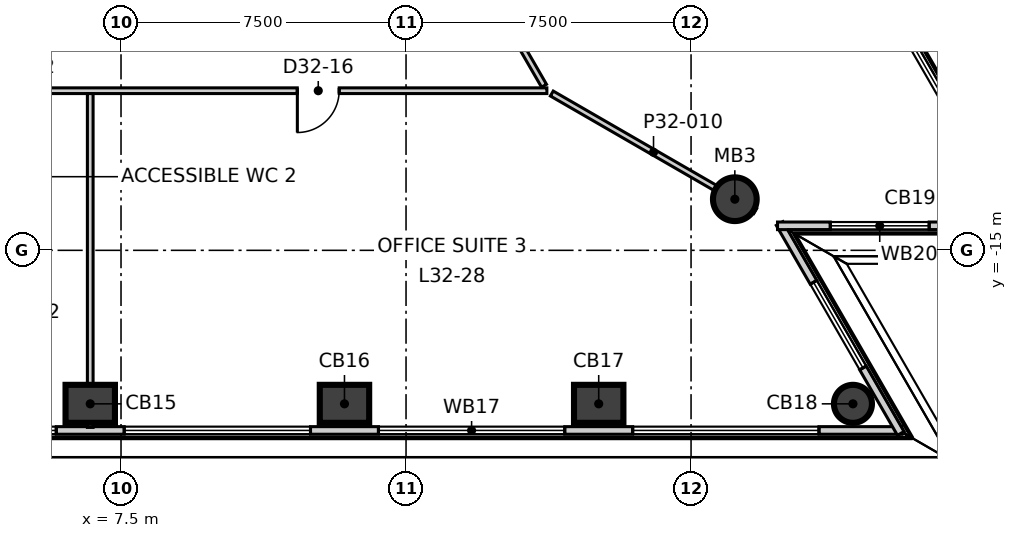
"""IFC4 building model, lengths in metres.
Left out: names, types, materials, properties, quantities, classifications, styles, units other than length and angle.
Written with IfcOpenShell. Run it as: python <this file> out.ifc"""

import sys

from ifc_helpers import new_model, si_unit, direction, frame, frame_2d, origin, origin_2d, place, context, subcontext, project, spatial, rectangle, circle, extrude, element, fill, save


model = new_model("IFC4")
c1 = context("Model", 3, precision=1e-05, world=origin(), true_north=direction((0.0, 1.0)))
c2 = subcontext(c1, "Body", "Model", "MODEL_VIEW")
j1 = project(units=[si_unit("LENGTHUNIT", "METRE"), si_unit("PLANEANGLEUNIT", "RADIAN")], contexts=[c1])
p1 = place(None, origin())
s1 = spatial("IfcSite", under=j1, at=p1, CompositionType="ELEMENT")
p2 = place(p1, origin())
s2 = spatial("IfcBuilding", under=s1, at=p2, CompositionType="ELEMENT")
p3 = place(p2, frame((0.0, 0.0, 140.3)))
s3 = spatial("IfcBuildingStorey", under=s2, at=p3, CompositionType="ELEMENT", Elevation=140.3)
for number, where, z_axis, x_axis in (
    (1, (6.69, -19.039, -0.3), (0.0, 0.0, 1.0), (1.0, 0.0, 0.0)),
    (2, (13.38, -19.039, -0.3), (0.0, 0.0, 1.0), (1.0, 0.0, 0.0)),
    (3, (20.07, -19.039, -0.3), (0.0, 0.0, 1.0), (1.0, 0.0, 0.0)),
):
    element("IfcColumn", number, at=place(p3, frame(where, z_axis=z_axis, x_axis=x_axis)), inside=s3, PredefinedType="COLUMN", context=c2, shape_type="SweptSolid", body=[
        extrude(rectangle(XDim=1.3, YDim=1.0, at=origin_2d()), origin(), (0.0, 0.0, 1.0), 4.0),
    ])
p4 = place(p3, frame((26.76, -19.039, -0.3), z_axis=(0.0, 0.0, 1.0), x_axis=(1.0, 0.0, 0.0)))
e4 = element("IfcColumn", 4, at=p4, inside=s3, PredefinedType="COLUMN", context=c2, shape_type="SweptSolid", body=[
    extrude(circle(Radius=0.5, at=origin_2d()), origin(), (0.0, 0.0, 1.0), 4.0),
])
p5 = place(p3, frame((23.652, -13.655, -0.3), z_axis=(0.0, 0.0, 1.0), x_axis=(1.0, 0.0, 0.0)))
e5 = element("IfcColumn", 5, at=p5, inside=s3, PredefinedType="COLUMN", context=c2, shape_type="SweptSolid", body=[
    extrude(circle(Radius=0.575, at=origin_2d()), origin(), (0.0, 0.0, 1.0), 4.0),
])
p6 = place(p3, frame((-28.063, -19.739, 0.0), z_axis=(0.0, 0.0, 1.0), x_axis=(1.0, 0.0, 0.0)))
e6 = element("IfcWall", 6, at=p6, inside=s3, PredefinedType="ELEMENTEDWALL", context=c2, shape_type="SweptSolid", body=[
    extrude(rectangle(XDim=56.106, YDim=0.2, at=frame_2d((28.053, 0.0))), origin(), (0.0, 0.0, 1.0), 3.7),
])
p7 = place(p6, frame((2.198, 0.0, 0.9)))
e7 = element("IfcOpeningElement", 7, at=p7, cuts=e6, PredefinedType="OPENING", context=c2, shape_type="SweptSolid", body=[
    extrude(rectangle(XDim=4.9, YDim=2.5, at=frame_2d((2.45, 1.25))), frame((0.0, 0.11, 0.0), z_axis=(0.0, -1.0, 0.0), x_axis=(1.0, 0.0, 0.0)), (0.0, 0.0, 1.0), 0.22),
])
p8 = place(p6, frame((8.888, 0.0, 0.9)))
e8 = element("IfcOpeningElement", 8, at=p8, cuts=e6, PredefinedType="OPENING", context=c2, shape_type="SweptSolid", body=[
    extrude(rectangle(XDim=4.9, YDim=2.5, at=frame_2d((2.45, 1.25))), frame((0.0, 0.11, 0.0), z_axis=(0.0, -1.0, 0.0), x_axis=(1.0, 0.0, 0.0)), (0.0, 0.0, 1.0), 0.22),
])
p9 = place(p6, frame((15.578, 0.0, 0.9)))
e9 = element("IfcOpeningElement", 9, at=p9, cuts=e6, PredefinedType="OPENING", context=c2, shape_type="SweptSolid", body=[
    extrude(rectangle(XDim=4.9, YDim=2.5, at=frame_2d((2.45, 1.25))), frame((0.0, 0.11, 0.0), z_axis=(0.0, -1.0, 0.0), x_axis=(1.0, 0.0, 0.0)), (0.0, 0.0, 1.0), 0.22),
])
p10 = place(p6, frame((22.268, 0.0, 0.9)))
e10 = element("IfcOpeningElement", 10, at=p10, cuts=e6, PredefinedType="OPENING", context=c2, shape_type="SweptSolid", body=[
    extrude(rectangle(XDim=4.9, YDim=2.5, at=frame_2d((2.45, 1.25))), frame((0.0, 0.11, 0.0), z_axis=(0.0, -1.0, 0.0), x_axis=(1.0, 0.0, 0.0)), (0.0, 0.0, 1.0), 0.22),
])
p11 = place(p6, frame((28.958, 0.0, 0.9)))
e11 = element("IfcOpeningElement", 11, at=p11, cuts=e6, PredefinedType="OPENING", context=c2, shape_type="SweptSolid", body=[
    extrude(rectangle(XDim=4.9, YDim=2.5, at=frame_2d((2.45, 1.25))), frame((0.0, 0.11, 0.0), z_axis=(0.0, -1.0, 0.0), x_axis=(1.0, 0.0, 0.0)), (0.0, 0.0, 1.0), 0.22),
])
p12 = place(p6, frame((35.648, 0.0, 0.9)))
e12 = element("IfcOpeningElement", 12, at=p12, cuts=e6, PredefinedType="OPENING", context=c2, shape_type="SweptSolid", body=[
    extrude(rectangle(XDim=4.9, YDim=2.5, at=frame_2d((2.45, 1.25))), frame((0.0, 0.11, 0.0), z_axis=(0.0, -1.0, 0.0), x_axis=(1.0, 0.0, 0.0)), (0.0, 0.0, 1.0), 0.22),
])
p13 = place(p6, frame((42.338, 0.0, 0.9)))
e13 = element("IfcOpeningElement", 13, at=p13, cuts=e6, PredefinedType="OPENING", context=c2, shape_type="SweptSolid", body=[
    extrude(rectangle(XDim=4.9, YDim=2.5, at=frame_2d((2.45, 1.25))), frame((0.0, 0.11, 0.0), z_axis=(0.0, -1.0, 0.0), x_axis=(1.0, 0.0, 0.0)), (0.0, 0.0, 1.0), 0.22),
])
p14 = place(p6, frame((49.028, 0.0, 0.9)))
e14 = element("IfcOpeningElement", 14, at=p14, cuts=e6, PredefinedType="OPENING", context=c2, shape_type="SweptSolid", body=[
    extrude(rectangle(XDim=4.9, YDim=2.5, at=frame_2d((2.45, 1.25))), frame((0.0, 0.11, 0.0), z_axis=(0.0, -1.0, 0.0), x_axis=(1.0, 0.0, 0.0)), (0.0, 0.0, 1.0), 0.22),
])
p15 = place(p3, frame((28.018, -19.817, 0.0), z_axis=(0.0, 0.0, 1.0), x_axis=(-0.499919089554, 0.866072112413, 0.0)))
e15 = element("IfcWall", 15, at=p15, inside=s3, PredefinedType="ELEMENTEDWALL", context=c2, shape_type="SweptSolid", body=[
    extrude(rectangle(XDim=6.377, YDim=0.2, at=frame_2d((3.188, 0.0))), origin(), (0.0, 0.0, 1.0), 3.7),
])
p16 = place(p15, frame((1.99, 0.0, 0.9)))
e16 = element("IfcOpeningElement", 16, at=p16, cuts=e15, PredefinedType="OPENING", context=c2, shape_type="SweptSolid", body=[
    extrude(rectangle(XDim=2.6, YDim=2.5, at=frame_2d((1.3, 1.25))), frame((0.0, 0.11, 0.0), z_axis=(0.0, -1.0, 0.0), x_axis=(1.0, 0.0, 0.0)), (0.0, 0.0, 1.0), 0.22),
])
p17 = place(p3, frame((24.775, -14.355, 0.0), z_axis=(0.0, 0.0, 1.0), x_axis=(1.0, 0.0, 0.0)))
e17 = element("IfcWall", 17, at=p17, inside=s3, PredefinedType="ELEMENTEDWALL", context=c2, shape_type="SweptSolid", body=[
    extrude(rectangle(XDim=6.376, YDim=0.2, at=frame_2d((3.188, 0.0))), origin(), (0.0, 0.0, 1.0), 3.7),
])
p18 = place(p17, frame((1.39, 0.0, 0.9)))
e18 = element("IfcOpeningElement", 18, at=p18, cuts=e17, PredefinedType="OPENING", context=c2, shape_type="SweptSolid", body=[
    extrude(rectangle(XDim=2.6, YDim=2.5, at=frame_2d((1.3, 1.25))), frame((0.0, 0.11, 0.0), z_axis=(0.0, -1.0, 0.0), x_axis=(1.0, 0.0, 0.0)), (0.0, 0.0, 1.0), 0.22),
])
p19 = place(p3, frame((31.126, -14.433, 0.0), z_axis=(0.0, 0.0, 1.0), x_axis=(-0.500008098571, 0.866020728022, 0.0)))
e19 = element("IfcWall", 19, at=p19, inside=s3, PredefinedType="ELEMENTEDWALL", context=c2, shape_type="SweptSolid", body=[
    extrude(rectangle(XDim=56.105, YDim=0.2, at=frame_2d((28.052, 0.0))), origin(), (0.0, 0.0, 1.0), 3.7),
])
p20 = place(p19, frame((2.198, 0.0, 0.9)))
e20 = element("IfcOpeningElement", 20, at=p20, cuts=e19, PredefinedType="OPENING", context=c2, shape_type="SweptSolid", body=[
    extrude(rectangle(XDim=4.9, YDim=2.5, at=frame_2d((2.45, 1.25))), frame((0.0, 0.11, 0.0), z_axis=(0.0, -1.0, 0.0), x_axis=(1.0, 0.0, 0.0)), (0.0, 0.0, 1.0), 0.22),
])
p21 = place(p19, frame((8.888, 0.0, 0.9)))
e21 = element("IfcOpeningElement", 21, at=p21, cuts=e19, PredefinedType="OPENING", context=c2, shape_type="SweptSolid", body=[
    extrude(rectangle(XDim=4.9, YDim=2.5, at=frame_2d((2.45, 1.25))), frame((0.0, 0.11, 0.0), z_axis=(0.0, -1.0, 0.0), x_axis=(1.0, 0.0, 0.0)), (0.0, 0.0, 1.0), 0.22),
])
p22 = place(p19, frame((15.578, 0.0, 0.9)))
e22 = element("IfcOpeningElement", 22, at=p22, cuts=e19, PredefinedType="OPENING", context=c2, shape_type="SweptSolid", body=[
    extrude(rectangle(XDim=4.9, YDim=2.5, at=frame_2d((2.45, 1.25))), frame((0.0, 0.11, 0.0), z_axis=(0.0, -1.0, 0.0), x_axis=(1.0, 0.0, 0.0)), (0.0, 0.0, 1.0), 0.22),
])
p23 = place(p19, frame((22.267, 0.0, 0.9)))
e23 = element("IfcOpeningElement", 23, at=p23, cuts=e19, PredefinedType="OPENING", context=c2, shape_type="SweptSolid", body=[
    extrude(rectangle(XDim=4.9, YDim=2.5, at=frame_2d((2.45, 1.25))), frame((0.0, 0.11, 0.0), z_axis=(0.0, -1.0, 0.0), x_axis=(1.0, 0.0, 0.0)), (0.0, 0.0, 1.0), 0.22),
])
p24 = place(p19, frame((28.957, 0.0, 0.9)))
e24 = element("IfcOpeningElement", 24, at=p24, cuts=e19, PredefinedType="OPENING", context=c2, shape_type="SweptSolid", body=[
    extrude(rectangle(XDim=4.9, YDim=2.5, at=frame_2d((2.45, 1.25))), frame((0.0, 0.11, 0.0), z_axis=(0.0, -1.0, 0.0), x_axis=(1.0, 0.0, 0.0)), (0.0, 0.0, 1.0), 0.22),
])
p25 = place(p19, frame((35.647, 0.0, 0.9)))
e25 = element("IfcOpeningElement", 25, at=p25, cuts=e19, PredefinedType="OPENING", context=c2, shape_type="SweptSolid", body=[
    extrude(rectangle(XDim=4.9, YDim=2.5, at=frame_2d((2.45, 1.25))), frame((0.0, 0.11, 0.0), z_axis=(0.0, -1.0, 0.0), x_axis=(1.0, 0.0, 0.0)), (0.0, 0.0, 1.0), 0.22),
])
p26 = place(p19, frame((42.337, 0.0, 0.9)))
e26 = element("IfcOpeningElement", 26, at=p26, cuts=e19, PredefinedType="OPENING", context=c2, shape_type="SweptSolid", body=[
    extrude(rectangle(XDim=4.9, YDim=2.5, at=frame_2d((2.45, 1.25))), frame((0.0, 0.11, 0.0), z_axis=(0.0, -1.0, 0.0), x_axis=(1.0, 0.0, 0.0)), (0.0, 0.0, 1.0), 0.22),
])
p27 = place(p19, frame((49.027, 0.0, 0.9)))
e27 = element("IfcOpeningElement", 27, at=p27, cuts=e19, PredefinedType="OPENING", context=c2, shape_type="SweptSolid", body=[
    extrude(rectangle(XDim=4.9, YDim=2.5, at=frame_2d((2.45, 1.25))), frame((0.0, 0.11, 0.0), z_axis=(0.0, -1.0, 0.0), x_axis=(1.0, 0.0, 0.0)), (0.0, 0.0, 1.0), 0.22),
])
p28 = place(p3, frame((-5.789, -10.8, 0.0), z_axis=(0.0, 0.0, 1.0), x_axis=(1.0, 0.0, 0.0)))
e28 = element("IfcWall", 28, at=p28, inside=s3, PredefinedType="PARTITIONING", context=c2, shape_type="SweptSolid", body=[
    extrude(rectangle(XDim=24.495, YDim=0.15, at=frame_2d((12.248, 0.0))), origin(), (0.0, 0.0, 1.0), 3.7),
])
p29 = place(p28, frame((10.049, 0.0, 0.0)))
e29 = element("IfcOpeningElement", 29, at=p29, cuts=e28, PredefinedType="OPENING", context=c2, shape_type="SweptSolid", body=[
    extrude(rectangle(XDim=1.1, YDim=2.1, at=frame_2d((0.55, 1.05))), frame((0.0, 0.085, 0.0), z_axis=(0.0, -1.0, 0.0), x_axis=(1.0, 0.0, 0.0)), (0.0, 0.0, 1.0), 0.17),
])
p30 = place(p28, frame((4.349, 0.0, 0.0)))
e30 = element("IfcOpeningElement", 30, at=p30, cuts=e28, PredefinedType="OPENING", context=c2, shape_type="SweptSolid", body=[
    extrude(rectangle(XDim=0.9, YDim=2.1, at=frame_2d((0.45, 1.05))), frame((0.0, 0.085, 0.0), z_axis=(0.0, -1.0, 0.0), x_axis=(1.0, 0.0, 0.0)), (0.0, 0.0, 1.0), 0.17),
])
p31 = place(p28, frame((7.149, 0.0, 0.0)))
e31 = element("IfcOpeningElement", 31, at=p31, cuts=e28, PredefinedType="OPENING", context=c2, shape_type="SweptSolid", body=[
    extrude(rectangle(XDim=1.0, YDim=2.1, at=frame_2d((0.5, 1.05))), frame((0.0, 0.085, 0.0), z_axis=(0.0, -1.0, 0.0), x_axis=(1.0, 0.0, 0.0)), (0.0, 0.0, 1.0), 0.17),
])
p32 = place(p28, frame((17.929, 0.0, 0.0)))
e32 = element("IfcOpeningElement", 32, at=p32, cuts=e28, PredefinedType="OPENING", context=c2, shape_type="SweptSolid", body=[
    extrude(rectangle(XDim=1.1, YDim=2.1, at=frame_2d((0.55, 1.05))), frame((0.0, 0.085, 0.0), z_axis=(0.0, -1.0, 0.0), x_axis=(1.0, 0.0, 0.0)), (0.0, 0.0, 1.0), 0.17),
])
p33 = place(p3, frame((18.836, -10.874, 0.0), z_axis=(0.0, 0.0, 1.0), x_axis=(0.865990889316, -0.500059776048, 0.0)))
e33 = element("IfcWall", 33, at=p33, inside=s3, PredefinedType="PARTITIONING", context=c2, shape_type="SweptSolid", body=[
    extrude(rectangle(XDim=6.181, YDim=0.15, at=frame_2d((3.091, 0.0))), origin(), (0.0, 0.0, 1.0), 3.15),
])
p34 = place(p3, frame((13.148, -1.174, 0.0), z_axis=(0.0, 0.0, 1.0), x_axis=(0.500088017957, -0.865974580629, 0.0)))
e34 = element("IfcWall", 34, at=p34, inside=s3, PredefinedType="PARTITIONING", context=c2, shape_type="SweptSolid", body=[
    extrude(rectangle(XDim=10.964, YDim=0.15, at=frame_2d((5.482, 0.0))), origin(), (0.0, 0.0, 1.0), 3.7),
])
p35 = place(p34, frame((4.964, 0.0, 0.0)))
e35 = element("IfcOpeningElement", 35, at=p35, cuts=e34, PredefinedType="OPENING", context=c2, shape_type="SweptSolid", body=[
    extrude(rectangle(XDim=1.1, YDim=2.1, at=frame_2d((0.55, 1.05))), frame((0.0, 0.085, 0.0), z_axis=(0.0, -1.0, 0.0), x_axis=(1.0, 0.0, 0.0)), (0.0, 0.0, 1.0), 0.17),
])
p36 = place(p3, frame((6.69, -19.659, 0.0), z_axis=(0.0, 0.0, 1.0), x_axis=(0.0, 1.0, 0.0)))
e36 = element("IfcWall", 36, at=p36, inside=s3, PredefinedType="PARTITIONING", context=c2, shape_type="SweptSolid", body=[
    extrude(rectangle(XDim=8.784, YDim=0.15, at=frame_2d((4.392, 0.0))), origin(), (0.0, 0.0, 1.0), 3.7),
])
p37 = place(p11, origin())
e37 = element("IfcWindow", 37, at=p37, inside=s3, PartitioningType="SINGLE_PANEL", PredefinedType="WINDOW", context=c2, shape_type="SweptSolid", body=[
    extrude(rectangle(XDim=4.9, YDim=2.5, at=frame_2d((2.45, 1.25))), frame((0.0, 0.03, 0.0), z_axis=(0.0, -1.0, 0.0), x_axis=(1.0, 0.0, 0.0)), (0.0, 0.0, 1.0), 0.06),
])
fill(e11, e37)
p38 = place(p12, origin())
e38 = element("IfcWindow", 38, at=p38, inside=s3, PartitioningType="SINGLE_PANEL", PredefinedType="WINDOW", context=c2, shape_type="SweptSolid", body=[
    extrude(rectangle(XDim=4.9, YDim=2.5, at=frame_2d((2.45, 1.25))), frame((0.0, 0.03, 0.0), z_axis=(0.0, -1.0, 0.0), x_axis=(1.0, 0.0, 0.0)), (0.0, 0.0, 1.0), 0.06),
])
fill(e12, e38)
p39 = place(p13, origin())
e39 = element("IfcWindow", 39, at=p39, inside=s3, PartitioningType="SINGLE_PANEL", PredefinedType="WINDOW", context=c2, shape_type="SweptSolid", body=[
    extrude(rectangle(XDim=4.9, YDim=2.5, at=frame_2d((2.45, 1.25))), frame((0.0, 0.03, 0.0), z_axis=(0.0, -1.0, 0.0), x_axis=(1.0, 0.0, 0.0)), (0.0, 0.0, 1.0), 0.06),
])
fill(e13, e39)
p40 = place(p14, origin())
e40 = element("IfcWindow", 40, at=p40, inside=s3, PartitioningType="SINGLE_PANEL", PredefinedType="WINDOW", context=c2, shape_type="SweptSolid", body=[
    extrude(rectangle(XDim=4.9, YDim=2.5, at=frame_2d((2.45, 1.25))), frame((0.0, 0.03, 0.0), z_axis=(0.0, -1.0, 0.0), x_axis=(1.0, 0.0, 0.0)), (0.0, 0.0, 1.0), 0.06),
])
fill(e14, e40)
p41 = place(p16, origin())
e41 = element("IfcWindow", 41, at=p41, inside=s3, PartitioningType="SINGLE_PANEL", PredefinedType="WINDOW", context=c2, shape_type="SweptSolid", body=[
    extrude(rectangle(XDim=2.6, YDim=2.5, at=frame_2d((1.3, 1.25))), frame((0.0, 0.03, 0.0), z_axis=(0.0, -1.0, 0.0), x_axis=(1.0, 0.0, 0.0)), (0.0, 0.0, 1.0), 0.06),
])
fill(e16, e41)
p42 = place(p18, origin())
e42 = element("IfcWindow", 42, at=p42, inside=s3, PartitioningType="SINGLE_PANEL", PredefinedType="WINDOW", context=c2, shape_type="SweptSolid", body=[
    extrude(rectangle(XDim=2.6, YDim=2.5, at=frame_2d((1.3, 1.25))), frame((0.0, 0.03, 0.0), z_axis=(0.0, -1.0, 0.0), x_axis=(1.0, 0.0, 0.0)), (0.0, 0.0, 1.0), 0.06),
])
fill(e18, e42)
p43 = place(p20, origin())
e43 = element("IfcWindow", 43, at=p43, inside=s3, PartitioningType="SINGLE_PANEL", PredefinedType="WINDOW", context=c2, shape_type="SweptSolid", body=[
    extrude(rectangle(XDim=4.9, YDim=2.5, at=frame_2d((2.45, 1.25))), frame((0.0, 0.03, 0.0), z_axis=(0.0, -1.0, 0.0), x_axis=(1.0, 0.0, 0.0)), (0.0, 0.0, 1.0), 0.06),
])
fill(e20, e43)
p44 = place(p32, origin())
e44 = element("IfcDoor", 44, at=p44, inside=s3, OperationType="SINGLE_SWING_LEFT", PredefinedType="DOOR", context=c2, shape_type="SweptSolid", body=[
    extrude(rectangle(XDim=1.1, YDim=2.1, at=frame_2d((0.55, 1.05))), frame((0.0, 0.025, 0.0), z_axis=(0.0, -1.0, 0.0), x_axis=(1.0, 0.0, 0.0)), (0.0, 0.0, 1.0), 0.05),
])
fill(e32, e44)
save(model, sys.argv[1])
